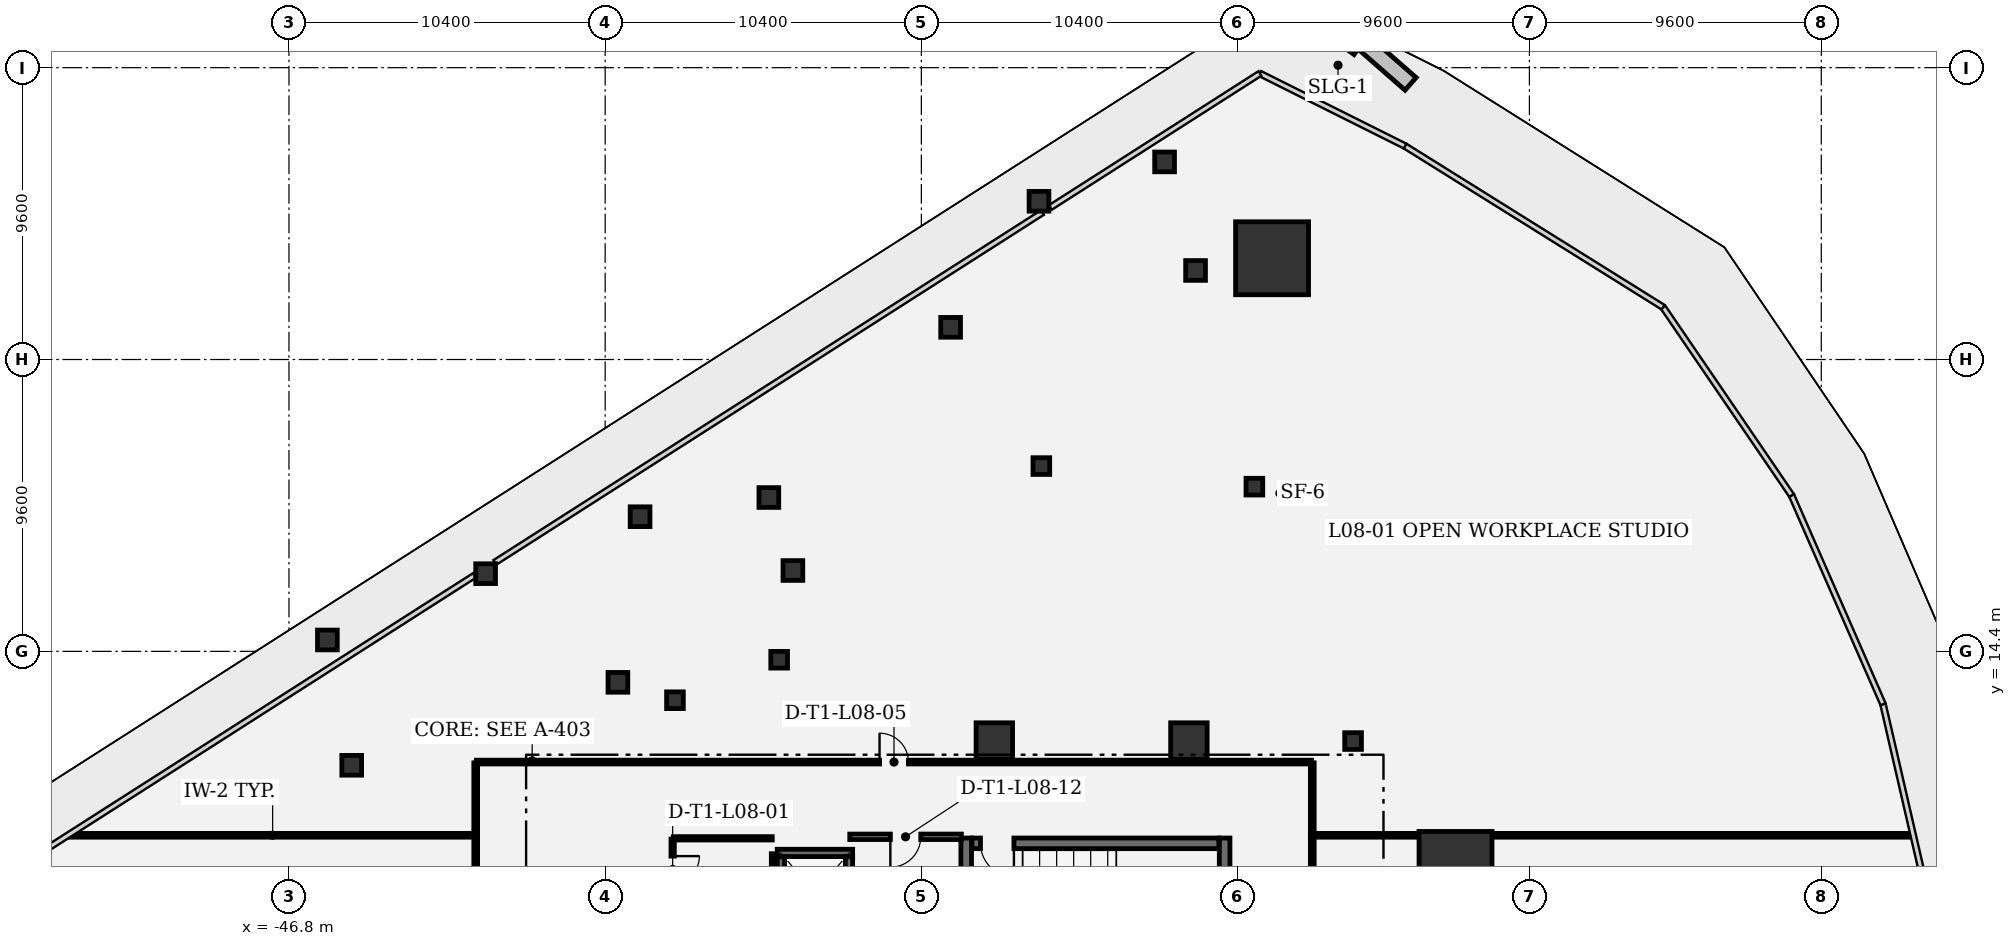
"""IFC4 building model, lengths in metres.
Left out: names, types, materials, properties, quantities, classifications, styles, units other than length and angle.
Written with IfcOpenShell. Run it as: python <this file> out.ifc"""

import sys

from ifc_helpers import new_model, si_unit, direction, frame, frame_2d, origin, origin_2d, place, context, subcontext, project, spatial, rectangle, extrude, element, fill, save


model = new_model("IFC4")
c1 = context("Model", 3, precision=1e-05, world=origin(), true_north=direction((0.0, 1.0)))
c2 = subcontext(c1, "Body", "Model", "MODEL_VIEW")
j1 = project(units=[si_unit("LENGTHUNIT", "METRE"), si_unit("PLANEANGLEUNIT", "RADIAN")], contexts=[c1])
p1 = place(None, origin())
s1 = spatial("IfcSite", under=j1, at=p1, CompositionType="ELEMENT")
p2 = place(p1, origin())
s2 = spatial("IfcBuilding", under=s1, at=p2, CompositionType="ELEMENT")
p3 = place(p2, frame((0.0, 0.0, 40.8)))
s3 = spatial("IfcBuildingStorey", under=s2, at=p3, CompositionType="ELEMENT", Elevation=40.8)
for number, where, z_axis, x_axis in (
    (1, (-8.43, 7.276, 0.0), (0.0, 0.0, 1.0), (1.0, 0.0, 0.0)),
    (2, (-14.464, 27.331, 0.0), (0.0, 0.0, 1.0), (1.0, 0.0, 0.0)),
):
    element("IfcColumn", number, at=place(p3, frame(where, z_axis=z_axis, x_axis=x_axis)), inside=s3, PredefinedType="COLUMN", context=c2, shape_type="SweptSolid", body=[
        extrude(rectangle(XDim=2.4, YDim=2.4, at=origin_2d()), origin(), (0.0, 0.0, 1.0), 4.2),
    ])
for number, where, z_axis, x_axis in (
    (3, (-23.6, 11.45, 0.0), (0.0, 0.0, 1.0), (1.0, 0.0, 0.0)),
    (4, (-17.2, 11.45, 0.0), (0.0, 0.0, 1.0), (1.0, 0.0, 0.0)),
):
    element("IfcColumn", number, at=place(p3, frame(where, z_axis=z_axis, x_axis=x_axis)), inside=s3, PredefinedType="COLUMN", context=c2, shape_type="SweptSolid", body=[
        extrude(rectangle(XDim=1.2, YDim=1.2, at=origin_2d()), origin(), (0.0, 0.0, 1.0), 4.2),
    ])
for number, where, z_axis, x_axis in (
    (5, (-45.536, 14.775, 0.0), (0.0, 0.0, 1.0), (1.0, 0.0, 0.0)),
    (6, (-22.131, 29.206, 0.0), (0.0, 0.0, 1.0), (1.0, 0.0, 0.0)),
    (7, (-40.333, 16.956, 0.0), (0.0, 0.0, 1.0), (1.0, 0.0, 0.0)),
    (8, (-18.0, 30.5, 0.0), (0.0, 0.0, 1.0), (1.0, 0.0, 0.0)),
    (9, (-35.252, 18.829, 0.0), (0.0, 0.0, 1.0), (1.0, 0.0, 0.0)),
    (10, (-25.038, 25.059, 0.0), (0.0, 0.0, 1.0), (1.0, 0.0, 0.0)),
    (11, (-31.016, 19.46, 0.0), (0.0, 0.0, 1.0), (1.0, 0.0, 0.0)),
    (12, (-44.736, 10.652, 0.0), (0.0, 0.0, 1.0), (1.0, 0.0, 0.0)),
    (13, (-16.981, 26.929, 0.0), (0.0, 0.0, 1.0), (1.0, 0.0, 0.0)),
    (14, (-35.981, 13.381, 0.0), (0.0, 0.0, 1.0), (1.0, 0.0, 0.0)),
    (15, (-30.225, 17.06, 0.0), (0.0, 0.0, 1.0), (1.0, 0.0, 0.0)),
):
    element("IfcColumn", number, at=place(p3, frame(where, z_axis=z_axis, x_axis=x_axis)), inside=s3, PredefinedType="COLUMN", context=c2, shape_type="SweptSolid", body=[
        extrude(rectangle(XDim=0.65, YDim=0.65, at=origin_2d()), origin(), (0.0, 0.0, 1.0), 4.2),
    ])
for number, where, z_axis, x_axis in (
    (16, (-34.104, 12.792, 0.0), (0.0, 0.0, 1.0), (1.0, 0.0, 0.0)),
    (17, (-22.053, 20.495, 0.0), (0.0, 0.0, 1.0), (1.0, 0.0, 0.0)),
    (18, (-30.677, 14.124, 0.0), (0.0, 0.0, 1.0), (1.0, 0.0, 0.0)),
    (19, (-15.046, 19.818, 0.0), (0.0, 0.0, 1.0), (1.0, 0.0, 0.0)),
    (20, (-11.8, 11.45, 0.0), (0.0, 0.0, 1.0), (1.0, 0.0, 0.0)),
):
    element("IfcColumn", number, at=place(p3, frame(where, z_axis=z_axis, x_axis=x_axis)), inside=s3, PredefinedType="COLUMN", context=c2, shape_type="SweptSolid", body=[
        extrude(rectangle(XDim=0.55, YDim=0.55, at=origin_2d()), origin(), (0.0, 0.0, 1.0), 4.2),
    ])
for number, where, z_axis, x_axis in (
    (21, (-24.525, 8.26, 0.0), (0.0, 0.0, 1.0), (0.0, -1.0, 0.0)),
    (22, (-16.025, 4.05, 0.0), (0.0, 0.0, 1.0), (0.0, 1.0, 0.0)),
):
    element("IfcWall", number, at=place(p3, frame(where, z_axis=z_axis, x_axis=x_axis)), inside=s3, PredefinedType="SHEAR", context=c2, shape_type="SweptSolid", body=[
        extrude(rectangle(XDim=4.21, YDim=0.35, at=frame_2d((2.105, 0.0))), origin(), (0.0, 0.0, 1.0), 3.92),
    ])
p4 = place(p3, frame((-16.215, 8.085, 0.0), z_axis=(0.0, 0.0, 1.0), x_axis=(-1.0, 0.0, 0.0)))
e23 = element("IfcWall", 23, at=p4, inside=s3, PredefinedType="SHEAR", context=c2, shape_type="SweptSolid", body=[
    extrude(rectangle(XDim=8.12, YDim=0.35, at=frame_2d((4.06, 0.0))), origin(), (0.0, 0.0, 1.0), 3.92),
])
p5 = place(p4, frame((6.74, 0.0, 0.0)))
e24 = element("IfcOpeningElement", 24, at=p5, cuts=e23, PredefinedType="OPENING", context=c2, shape_type="SweptSolid", body=[
    extrude(rectangle(XDim=1.1, YDim=2.2, at=frame_2d((0.55, 1.1))), frame((0.0, 0.185, 0.0), z_axis=(0.0, -1.0, 0.0), x_axis=(1.0, 0.0, 0.0)), (0.0, 0.0, 1.0), 0.37),
])
p6 = place(p3, frame((-30.74, 7.77, 0.0), z_axis=(0.0, 0.0, 1.0), x_axis=(1.0, 0.0, 0.0)))
e25 = element("IfcWall", 25, at=p6, inside=s3, PredefinedType="SHEAR", context=c2, shape_type="SweptSolid", body=[
    extrude(rectangle(XDim=2.48, YDim=0.24, at=frame_2d((1.24, 0.0))), origin(), (0.0, 0.0, 1.0), 3.92),
])
p7 = place(p3, frame((-30.62, 5.262, 0.0), z_axis=(0.0, 0.0, 1.0), x_axis=(0.0, 1.0, 0.0)))
e26 = element("IfcWall", 26, at=p7, inside=s3, PredefinedType="SHEAR", context=c2, shape_type="SweptSolid", body=[
    extrude(rectangle(XDim=2.376, YDim=0.24, at=frame_2d((1.188, 0.0))), origin(), (0.0, 0.0, 1.0), 3.92),
])
p8 = place(p3, frame((-28.38, 7.638, 0.0), z_axis=(0.0, 0.0, 1.0), x_axis=(0.0, -1.0, 0.0)))
e27 = element("IfcWall", 27, at=p8, inside=s3, PredefinedType="SHEAR", context=c2, shape_type="SweptSolid", body=[
    extrude(rectangle(XDim=2.376, YDim=0.24, at=frame_2d((1.188, 0.0))), origin(), (0.0, 0.0, 1.0), 3.92),
])
p9 = place(p8, frame((0.538, 0.0, 0.0)))
e28 = element("IfcOpeningElement", 28, at=p9, cuts=e27, PredefinedType="OPENING", context=c2, shape_type="SweptSolid", body=[
    extrude(rectangle(XDim=1.3, YDim=2.3, at=frame_2d((0.65, 1.15))), frame((0.0, 0.13, 0.0), z_axis=(0.0, -1.0, 0.0), x_axis=(1.0, 0.0, 0.0)), (0.0, 0.0, 1.0), 0.26),
])
p10 = place(p3, frame((-24.684, 8.3, 0.0), z_axis=(0.0, 0.0, 1.0), x_axis=(-1.0, 0.0, 0.0)))
e29 = element("IfcWall", 29, at=p10, inside=s3, PredefinedType="PARTITIONING", context=c2, shape_type="SweptSolid", body=[
    extrude(rectangle(XDim=3.671, YDim=0.18, at=frame_2d((1.835, 0.0))), origin(), (0.0, 0.0, 1.0), 3.92),
])
p11 = place(p10, frame((1.335, 0.0, 0.0)))
e30 = element("IfcOpeningElement", 30, at=p11, cuts=e29, PredefinedType="OPENING", context=c2, shape_type="SweptSolid", body=[
    extrude(rectangle(XDim=1.0, YDim=2.15, at=frame_2d((0.5, 1.075))), frame((0.0, 0.1, 0.0), z_axis=(0.0, -1.0, 0.0), x_axis=(1.0, 0.0, 0.0)), (0.0, 0.0, 1.0), 0.2),
])
p12 = place(p3, frame((-34.18, 8.225, 0.0), z_axis=(0.0, 0.0, 1.0), x_axis=(0.0, -1.0, 0.0)))
e31 = element("IfcWall", 31, at=p12, inside=s3, PredefinedType="PARTITIONING", context=c2, shape_type="SweptSolid", body=[
    extrude(rectangle(XDim=2.0, YDim=0.11, at=frame_2d((1.0, 0.0))), origin(), (0.0, 0.0, 1.0), 3.92),
])
p13 = place(p12, frame((0.56, 0.0, 0.0)))
e32 = element("IfcOpeningElement", 32, at=p13, cuts=e31, PredefinedType="OPENING", context=c2, shape_type="SweptSolid", body=[
    extrude(rectangle(XDim=0.88, YDim=2.1, at=frame_2d((0.44, 1.05))), frame((0.0, 0.065, 0.0), z_axis=(0.0, -1.0, 0.0), x_axis=(1.0, 0.0, 0.0)), (0.0, 0.0, 1.0), 0.13),
])
p14 = place(p3, frame((-30.88, 6.225, 0.0), z_axis=(0.0, 0.0, 1.0), x_axis=(0.0, 1.0, 0.0)))
e33 = element("IfcWall", 33, at=p14, inside=s3, PredefinedType="PARTITIONING", context=c2, shape_type="SweptSolid", body=[
    extrude(rectangle(XDim=1.518, YDim=0.11, at=frame_2d((0.759, 0.0))), origin(), (0.0, 0.0, 1.0), 3.92),
])
p15 = place(p3, frame((-30.905, 8.25, 0.0), z_axis=(0.0, 0.0, 1.0), x_axis=(-1.0, 0.0, 0.0)))
e34 = element("IfcWall", 34, at=p15, inside=s3, PredefinedType="PARTITIONING", context=c2, shape_type="SweptSolid", body=[
    extrude(rectangle(XDim=3.25, YDim=0.11, at=frame_2d((1.625, 0.0))), origin(), (0.0, 0.0, 1.0), 3.92),
])
p16 = place(p3, frame((-53.99, 8.35, 0.0), z_axis=(0.0, 0.0, 1.0), x_axis=(1.0, 0.0, 0.0)))
e35 = element("IfcWall", 35, at=p16, inside=s3, PredefinedType="PARTITIONING", context=c2, shape_type="SweptSolid", body=[
    extrude(rectangle(XDim=13.307, YDim=0.125, at=frame_2d((6.653, 0.0))), origin(), (0.0, 0.0, 1.0), 2.89),
])
p17 = place(p3, frame((-40.658, 10.733, 0.0), z_axis=(0.0, 0.0, 1.0), x_axis=(0.0, -1.0, 0.0)))
e36 = element("IfcWall", 36, at=p17, inside=s3, PredefinedType="PARTITIONING", context=c2, shape_type="SweptSolid", body=[
    extrude(rectangle(XDim=2.358, YDim=0.125, at=frame_2d((1.179, 0.0))), origin(), (0.0, 0.0, 1.0), 3.92),
])
p18 = place(p3, frame((-40.633, 10.758, 0.0), z_axis=(0.0, 0.0, 1.0), x_axis=(1.0, 0.0, 0.0)))
e37 = element("IfcWall", 37, at=p18, inside=s3, PredefinedType="PARTITIONING", context=c2, shape_type="SweptSolid", body=[
    extrude(rectangle(XDim=27.466, YDim=0.125, at=frame_2d((13.733, 0.0))), origin(), (0.0, 0.0, 1.0), 2.957),
])
p19 = place(p18, frame((13.258, 0.0, 0.0)))
e38 = element("IfcOpeningElement", 38, at=p19, cuts=e37, PredefinedType="OPENING", context=c2, shape_type="SweptSolid", body=[
    extrude(rectangle(XDim=0.95, YDim=2.15, at=frame_2d((0.475, 1.075))), frame((0.0, 0.073, 0.0), z_axis=(0.0, -1.0, 0.0), x_axis=(1.0, 0.0, 0.0)), (0.0, 0.0, 1.0), 0.145),
])
p20 = place(p3, frame((-13.142, 8.375, 0.0), z_axis=(0.0, 0.0, 1.0), x_axis=(0.0, 1.0, 0.0)))
e39 = element("IfcWall", 39, at=p20, inside=s3, PredefinedType="PARTITIONING", context=c2, shape_type="SweptSolid", body=[
    extrude(rectangle(XDim=2.358, YDim=0.125, at=frame_2d((1.179, 0.0))), origin(), (0.0, 0.0, 1.0), 3.92),
])
p21 = place(p3, frame((-13.117, 8.35, 0.0), z_axis=(0.0, 0.0, 1.0), x_axis=(1.0, 0.0, 0.0)))
e40 = element("IfcWall", 40, at=p21, inside=s3, PredefinedType="PARTITIONING", context=c2, shape_type="SweptSolid", body=[
    extrude(rectangle(XDim=3.422, YDim=0.125, at=frame_2d((1.711, 0.0))), origin(), (0.0, 0.0, 1.0), 2.957),
])
p22 = place(p3, frame((-7.165, 8.35, 0.0), z_axis=(0.0, 0.0, 1.0), x_axis=(1.0, 0.0, 0.0)))
e41 = element("IfcWall", 41, at=p22, inside=s3, PredefinedType="PARTITIONING", context=c2, shape_type="SweptSolid", body=[
    extrude(rectangle(XDim=13.71, YDim=0.125, at=frame_2d((6.855, 0.0))), origin(), (0.0, 0.0, 1.0), 3.92),
])
p23 = place(p3, frame((-13.142, 8.317, 0.0), z_axis=(0.0, 0.0, 1.0), x_axis=(0.0, -1.0, 0.0)))
e42 = element("IfcWall", 42, at=p23, inside=s3, PredefinedType="PARTITIONING", context=c2, shape_type="SweptSolid", body=[
    extrude(rectangle(XDim=7.493, YDim=0.125, at=frame_2d((3.746, 0.0))), origin(), (0.0, 0.0, 1.0), 3.92),
])
p24 = place(p23, frame((3.271, 0.0, 0.0)))
e43 = element("IfcOpeningElement", 43, at=p24, cuts=e42, PredefinedType="OPENING", context=c2, shape_type="SweptSolid", body=[
    extrude(rectangle(XDim=0.95, YDim=2.15, at=frame_2d((0.475, 1.075))), frame((0.0, 0.073, 0.0), z_axis=(0.0, -1.0, 0.0), x_axis=(1.0, 0.0, 0.0)), (0.0, 0.0, 1.0), 0.145),
])
p25 = place(p3, frame((-40.658, -8.517, 0.0), z_axis=(0.0, 0.0, 1.0), x_axis=(0.0, 1.0, 0.0)))
e44 = element("IfcWall", 44, at=p25, inside=s3, PredefinedType="PARTITIONING", context=c2, shape_type="SweptSolid", body=[
    extrude(rectangle(XDim=16.834, YDim=0.125, at=frame_2d((8.417, 0.0))), origin(), (0.0, 0.0, 1.0), 3.92),
])
p26 = place(p25, frame((7.942, 0.0, 0.0)))
e45 = element("IfcOpeningElement", 45, at=p26, cuts=e44, PredefinedType="OPENING", context=c2, shape_type="SweptSolid", body=[
    extrude(rectangle(XDim=0.95, YDim=2.15, at=frame_2d((0.475, 1.075))), frame((0.0, 0.073, 0.0), z_axis=(0.0, -1.0, 0.0), x_axis=(1.0, 0.0, 0.0)), (0.0, 0.0, 1.0), 0.145),
])
p27 = place(p5, origin())
e46 = element("IfcDoor", 46, at=p27, inside=s3, OperationType="SINGLE_SWING_LEFT", PredefinedType="DOOR", context=c2, shape_type="SweptSolid", body=[
    extrude(rectangle(XDim=1.1, YDim=2.2, at=frame_2d((0.55, 1.1))), frame((0.0, 0.025, 0.0), z_axis=(0.0, -1.0, 0.0), x_axis=(1.0, 0.0, 0.0)), (0.0, 0.0, 1.0), 0.05),
])
fill(e24, e46)
p28 = place(p13, origin())
e47 = element("IfcDoor", 47, at=p28, inside=s3, OperationType="SINGLE_SWING_LEFT", PredefinedType="DOOR", context=c2, shape_type="SweptSolid", body=[
    extrude(rectangle(XDim=0.88, YDim=2.1, at=frame_2d((0.44, 1.05))), frame((0.0, 0.025, 0.0), z_axis=(0.0, -1.0, 0.0), x_axis=(1.0, 0.0, 0.0)), (0.0, 0.0, 1.0), 0.05),
])
fill(e32, e47)
p29 = place(p19, origin())
e48 = element("IfcDoor", 48, at=p29, inside=s3, OperationType="SINGLE_SWING_LEFT", PredefinedType="DOOR", context=c2, shape_type="SweptSolid", body=[
    extrude(rectangle(XDim=0.95, YDim=2.15, at=frame_2d((0.475, 1.075))), frame((0.0, 0.025, 0.0), z_axis=(0.0, -1.0, 0.0), x_axis=(1.0, 0.0, 0.0)), (0.0, 0.0, 1.0), 0.05),
])
fill(e38, e48)
p30 = place(p11, origin())
e49 = element("IfcDoor", 49, at=p30, inside=s3, OperationType="SINGLE_SWING_RIGHT", PredefinedType="DOOR", context=c2, shape_type="SweptSolid", body=[
    extrude(rectangle(XDim=1.0, YDim=2.15, at=frame_2d((0.5, 1.075))), frame((0.0, 0.025, 0.0), z_axis=(0.0, -1.0, 0.0), x_axis=(1.0, 0.0, 0.0)), (0.0, 0.0, 1.0), 0.05),
])
fill(e30, e49)
save(model, sys.argv[1])
